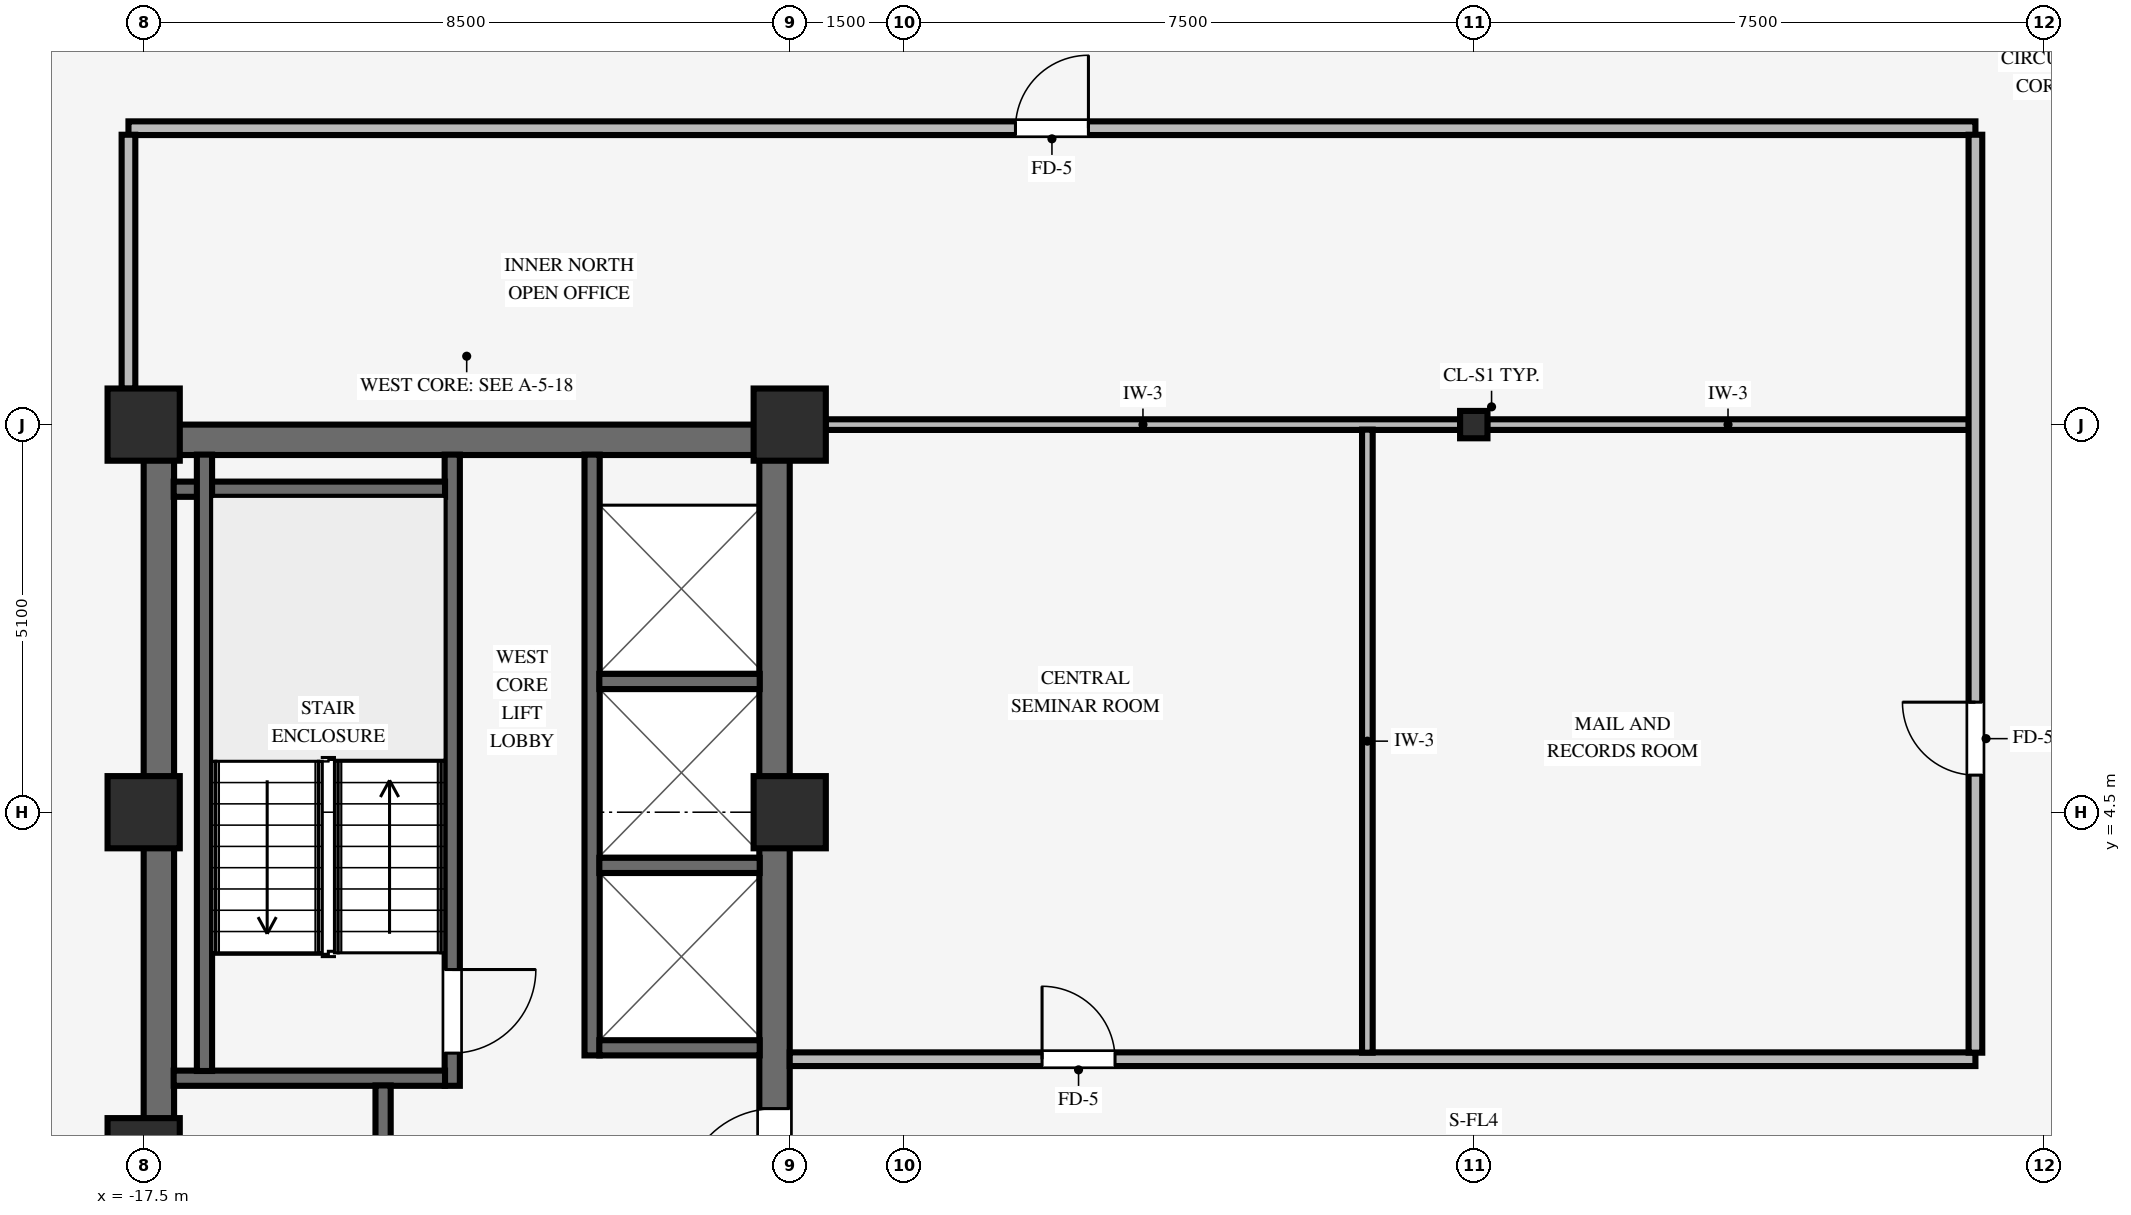
"""IFC4 building model, lengths in metres.
Left out: names, types, materials, properties, quantities, classifications, styles, units other than length and angle.
Written with IfcOpenShell. Run it as: python <this file> out.ifc"""

import sys

from ifc_helpers import new_model, si_unit, direction, frame, frame_2d, origin, origin_2d, place, context, subcontext, project, spatial, rectangle, i_section, extrude, source, transform, mapped, element, fill, save


model = new_model("IFC4")
c1 = context("Model", 3, precision=1e-05, world=origin(), true_north=direction((0.0, 1.0)))
c2 = subcontext(c1, "Body", "Model", "MODEL_VIEW")
j1 = project(units=[si_unit("LENGTHUNIT", "METRE"), si_unit("PLANEANGLEUNIT", "RADIAN")], contexts=[c1])
p1 = place(None, origin())
s1 = spatial("IfcSite", under=j1, at=p1, CompositionType="ELEMENT")
p2 = place(p1, origin())
s2 = spatial("IfcBuilding", under=s1, at=p2, CompositionType="ELEMENT")
p3 = place(p2, frame((0.0, 0.0, 134.8)))
s3 = spatial("IfcBuildingStorey", under=s2, at=p3, CompositionType="ELEMENT", Elevation=134.8)
p4 = place(p3, frame((-17.5, 9.4, 0.0), z_axis=(0.0, 0.0, 1.0), x_axis=(1.0, 0.0, 0.0)))
e1 = element("IfcWall", 1, at=p4, inside=s3, PredefinedType="SHEAR", context=c2, shape_type="SweptSolid", body=[
    extrude(rectangle(XDim=8.5, YDim=0.4, at=frame_2d((4.25, 0.0))), origin(), (0.0, 0.0, 1.0), 3.37),
])
p5 = place(p3, frame((-17.3, -9.205, 0.0), z_axis=(0.0, 0.0, 1.0), x_axis=(0.0, 1.0, 0.0)))
e2 = element("IfcWall", 2, at=p5, inside=s3, PredefinedType="SHEAR", context=c2, shape_type="SweptSolid", body=[
    extrude(rectangle(XDim=18.41, YDim=0.4, at=frame_2d((9.205, 0.0))), origin(), (0.0, 0.0, 1.0), 3.37),
])
p6 = place(p3, frame((-9.2, -9.205, 0.0), z_axis=(0.0, 0.0, 1.0), x_axis=(0.0, 1.0, 0.0)))
e3 = element("IfcWall", 3, at=p6, inside=s3, PredefinedType="SHEAR", context=c2, shape_type="SweptSolid", body=[
    extrude(rectangle(XDim=18.41, YDim=0.4, at=frame_2d((9.205, 0.0))), origin(), (0.0, 0.0, 1.0), 3.37),
])
p7 = place(p6, frame((8.605, 0.0, 0.0)))
e4 = element("IfcOpeningElement", 4, at=p7, cuts=e3, PredefinedType="OPENING", context=c2, shape_type="SweptSolid", body=[
    extrude(rectangle(XDim=1.2, YDim=2.15, at=frame_2d((0.6, 1.075))), frame((0.0, 0.21, 0.0), z_axis=(0.0, -1.0, 0.0), x_axis=(1.0, 0.0, 0.0)), (0.0, 0.0, 1.0), 0.42),
])
for number, where, z_axis, x_axis in (
    (5, (-17.5, 4.5, 0.0), (0.0, 0.0, 1.0), (1.0, 0.0, 0.0)),
    (6, (-17.5, 9.6, 0.0), (0.0, 0.0, 1.0), (1.0, 0.0, 0.0)),
    (7, (-9.0, 4.5, 0.0), (0.0, 0.0, 1.0), (1.0, 0.0, 0.0)),
    (8, (-9.0, 9.6, 0.0), (0.0, 0.0, 1.0), (1.0, 0.0, 0.0)),
    (9, (-17.5, 0.0, 0.0), (0.0, 0.0, 1.0), (1.0, 0.0, 0.0)),
):
    element("IfcColumn", number, at=place(p3, frame(where, z_axis=z_axis, x_axis=x_axis)), inside=s3, PredefinedType="COLUMN", context=c2, shape_type="SweptSolid", body=[
        extrude(rectangle(XDim=0.95, YDim=0.95, at=origin_2d()), origin(), (0.0, 0.0, 1.0), 3.37),
    ])
p8 = place(p3, frame((0.0, 9.6, 0.0), z_axis=(0.0, 0.0, 1.0), x_axis=(1.0, 0.0, 0.0)))
e10 = element("IfcColumn", 10, at=p8, inside=s3, PredefinedType="COLUMN", context=c2, shape_type="SweptSolid", body=[
    extrude(i_section(OverallWidth=0.36, OverallDepth=0.36, WebThickness=0.021, FlangeThickness=0.021, FilletRadius=0.018, at=origin_2d()), origin(), (0.0, 0.0, 1.0), 3.37),
])
p9 = place(p3, frame((-13.44, 0.9, 0.0), z_axis=(0.0, 0.0, 1.0), x_axis=(0.0, 1.0, 0.0)))
e11 = element("IfcWall", 11, at=p9, inside=s3, PredefinedType="SHEAR", context=c2, shape_type="SweptSolid", body=[
    extrude(rectangle(XDim=8.305, YDim=0.2, at=frame_2d((4.153, 0.0))), origin(), (0.0, 0.0, 1.0), 3.37),
])
p10 = place(p9, frame((1.53, 0.0, 0.0), z_axis=(0.0, 0.0, 1.0), x_axis=(-1.0, 0.0, 0.0)))
e12 = element("IfcOpeningElement", 12, at=p10, cuts=e11, PredefinedType="OPENING", context=c2, shape_type="SweptSolid", body=[
    extrude(rectangle(XDim=1.1, YDim=2.15, at=frame_2d((0.55, 1.075))), frame((0.0, 0.11, 0.0), z_axis=(0.0, -1.0, 0.0), x_axis=(1.0, 0.0, 0.0)), (0.0, 0.0, 1.0), 0.22),
])
for number, where, z_axis, x_axis in (
    (13, (-17.105, 1.0, 0.0), (0.0, 0.0, 1.0), (1.0, 0.0, 0.0)),
    (14, (-17.105, 8.75, 0.0), (0.0, 0.0, 1.0), (1.0, 0.0, 0.0)),
):
    element("IfcWall", number, at=place(p3, frame(where, z_axis=z_axis, x_axis=x_axis)), inside=s3, PredefinedType="SHEAR", context=c2, shape_type="SweptSolid", body=[
        extrude(rectangle(XDim=3.57, YDim=0.2, at=frame_2d((1.785, 0.0))), origin(), (0.0, 0.0, 1.0), 3.37),
    ])
p11 = place(p3, frame((-16.7, 1.095, 0.0), z_axis=(0.0, 0.0, 1.0), x_axis=(0.0, 1.0, 0.0)))
e15 = element("IfcWall", 15, at=p11, inside=s3, PredefinedType="SHEAR", context=c2, shape_type="SweptSolid", body=[
    extrude(rectangle(XDim=8.11, YDim=0.2, at=frame_2d((4.055, 0.0))), origin(), (0.0, 0.0, 1.0), 3.37),
])
p12 = place(p3, frame((-14.35, -6.2, 0.0), z_axis=(0.0, 0.0, 1.0), x_axis=(0.0, 1.0, 0.0)))
e16 = element("IfcWall", 16, at=p12, inside=s3, PredefinedType="SHEAR", context=c2, shape_type="SweptSolid", body=[
    extrude(rectangle(XDim=7.105, YDim=0.2, at=frame_2d((3.552, 0.0))), origin(), (0.0, 0.0, 1.0), 3.37),
])
p13 = place(p12, frame((5.69, 0.0, 0.0), z_axis=(0.0, 0.0, 1.0), x_axis=(-1.0, 0.0, 0.0)))
e17 = element("IfcOpeningElement", 17, at=p13, cuts=e16, PredefinedType="OPENING", context=c2, shape_type="SweptSolid", body=[
    extrude(rectangle(XDim=0.88, YDim=2.1, at=frame_2d((0.44, 1.05))), frame((0.0, 0.11, 0.0), z_axis=(0.0, -1.0, 0.0), x_axis=(1.0, 0.0, 0.0)), (0.0, 0.0, 1.0), 0.22),
])
p14 = place(p12, frame((1.15, 0.0, 0.0)))
e18 = element("IfcOpeningElement", 18, at=p14, cuts=e16, PredefinedType="OPENING", context=c2, shape_type="SweptSolid", body=[
    extrude(rectangle(XDim=1.3, YDim=2.2, at=frame_2d((0.65, 1.1))), frame((0.0, 0.11, 0.0), z_axis=(0.0, -1.0, 0.0), x_axis=(1.0, 0.0, 0.0)), (0.0, 0.0, 1.0), 0.22),
])
p15 = place(p3, frame((-11.6, 1.3, 0.0), z_axis=(0.0, 0.0, 1.0), x_axis=(0.0, 1.0, 0.0)))
e19 = element("IfcWall", 19, at=p15, inside=s3, PredefinedType="SHEAR", context=c2, shape_type="SweptSolid", body=[
    extrude(rectangle(XDim=7.905, YDim=0.2, at=frame_2d((3.953, 0.0))), origin(), (0.0, 0.0, 1.0), 3.37),
])
for number, where, z_axis, x_axis in (
    (20, (-11.505, 1.4, 0.0), (0.0, 0.0, 1.0), (1.0, 0.0, 0.0)),
    (21, (-11.505, 3.8, 0.0), (0.0, 0.0, 1.0), (1.0, 0.0, 0.0)),
    (22, (-11.505, 6.22, 0.0), (0.0, 0.0, 1.0), (1.0, 0.0, 0.0)),
):
    element("IfcWall", number, at=place(p3, frame(where, z_axis=z_axis, x_axis=x_axis)), inside=s3, PredefinedType="SHEAR", context=c2, shape_type="SweptSolid", body=[
        extrude(rectangle(XDim=2.11, YDim=0.2, at=frame_2d((1.055, 0.0))), origin(), (0.0, 0.0, 1.0), 3.37),
    ])
p16 = place(p3, frame((-9.0, 1.25, 0.0), z_axis=(0.0, 0.0, 1.0), x_axis=(1.0, 0.0, 0.0)))
e23 = element("IfcWall", 23, at=p16, inside=s3, PredefinedType="PARTITIONING", context=c2, shape_type="SweptSolid", body=[
    extrude(rectangle(XDim=15.6, YDim=0.18, at=frame_2d((7.8, 0.0))), origin(), (0.0, 0.0, 1.0), 3.36),
])
p17 = place(p16, frame((3.32, 0.0, 0.0)))
e24 = element("IfcOpeningElement", 24, at=p17, cuts=e23, PredefinedType="OPENING", context=c2, shape_type="SweptSolid", body=[
    extrude(rectangle(XDim=0.96, YDim=2.1, at=frame_2d((0.48, 1.05))), frame((0.0, 0.1, 0.0), z_axis=(0.0, -1.0, 0.0), x_axis=(1.0, 0.0, 0.0)), (0.0, 0.0, 1.0), 0.2),
])
p18 = place(p3, frame((-8.529, 9.6, 0.0), z_axis=(0.0, 0.0, 1.0), x_axis=(1.0, 0.0, 0.0)))
e25 = element("IfcWall", 25, at=p18, inside=s3, PredefinedType="PARTITIONING", context=c2, shape_type="SweptSolid", body=[
    extrude(rectangle(XDim=8.353, YDim=0.14, at=frame_2d((4.177, 0.0))), origin(), (0.0, 0.0, 1.0), 2.405),
])
p19 = place(p3, frame((0.176, 9.6, 0.0), z_axis=(0.0, 0.0, 1.0), x_axis=(1.0, 0.0, 0.0)))
e26 = element("IfcWall", 26, at=p19, inside=s3, PredefinedType="PARTITIONING", context=c2, shape_type="SweptSolid", body=[
    extrude(rectangle(XDim=6.338, YDim=0.14, at=frame_2d((3.169, 0.0))), origin(), (0.0, 0.0, 1.0), 2.405),
])
p20 = place(p3, frame((-17.7, 13.5, 0.0), z_axis=(0.0, 0.0, 1.0), x_axis=(1.0, 0.0, 0.0)))
e27 = element("IfcWall", 27, at=p20, inside=s3, PredefinedType="PARTITIONING", context=c2, shape_type="SweptSolid", body=[
    extrude(rectangle(XDim=24.3, YDim=0.18, at=frame_2d((12.15, 0.0))), origin(), (0.0, 0.0, 1.0), 2.998),
])
p21 = place(p20, frame((11.67, 0.0, 0.0)))
e28 = element("IfcOpeningElement", 28, at=p21, cuts=e27, PredefinedType="OPENING", context=c2, shape_type="SweptSolid", body=[
    extrude(rectangle(XDim=0.96, YDim=2.1, at=frame_2d((0.48, 1.05))), frame((0.0, 0.1, 0.0), z_axis=(0.0, -1.0, 0.0), x_axis=(1.0, 0.0, 0.0)), (0.0, 0.0, 1.0), 0.2),
])
p22 = place(p3, frame((-17.7, 10.071, 0.0), z_axis=(0.0, 0.0, 1.0), x_axis=(0.0, 1.0, 0.0)))
e29 = element("IfcWall", 29, at=p22, inside=s3, PredefinedType="PARTITIONING", context=c2, shape_type="SweptSolid", body=[
    extrude(rectangle(XDim=3.343, YDim=0.18, at=frame_2d((1.671, 0.0))), origin(), (0.0, 0.0, 1.0), 2.816),
])
p23 = place(p3, frame((-1.4, 1.336, 0.0), z_axis=(0.0, 0.0, 1.0), x_axis=(0.0, 1.0, 0.0)))
e30 = element("IfcWall", 30, at=p23, inside=s3, PredefinedType="PARTITIONING", context=c2, shape_type="SweptSolid", body=[
    extrude(rectangle(XDim=8.198, YDim=0.14, at=frame_2d((4.099, 0.0))), origin(), (0.0, 0.0, 1.0), 3.36),
])
p24 = place(p3, frame((6.6, 1.336, 0.0), z_axis=(0.0, 0.0, 1.0), x_axis=(0.0, 1.0, 0.0)))
e31 = element("IfcWall", 31, at=p24, inside=s3, PredefinedType="PARTITIONING", context=c2, shape_type="SweptSolid", body=[
    extrude(rectangle(XDim=12.078, YDim=0.18, at=frame_2d((6.039, 0.0))), origin(), (0.0, 0.0, 1.0), 3.36),
])
p25 = place(p24, frame((3.652, 0.0, 0.0)))
e32 = element("IfcOpeningElement", 32, at=p25, cuts=e31, PredefinedType="OPENING", context=c2, shape_type="SweptSolid", body=[
    extrude(rectangle(XDim=0.96, YDim=2.1, at=frame_2d((0.48, 1.05))), frame((0.0, 0.1, 0.0), z_axis=(0.0, -1.0, 0.0), x_axis=(1.0, 0.0, 0.0)), (0.0, 0.0, 1.0), 0.2),
])
m1 = source(origin(), c2, "Body", "SweptSolid", [
    extrude(rectangle(XDim=1.1, YDim=2.15, at=frame_2d((0.55, 1.075))), frame((0.0, 0.025, 0.0), z_axis=(0.0, -1.0, 0.0), x_axis=(1.0, 0.0, 0.0)), (0.0, 0.0, 1.0), 0.05),
])
p26 = place(p10, origin())
e33 = element("IfcDoor", 33, at=p26, inside=s3, OperationType="SINGLE_SWING_LEFT", PredefinedType="DOOR", context=c2, shape_type="MappedRepresentation", body=[
    mapped(m1, transform((0.0, 0.0, 0.0), scale=1.0)),
])
fill(e12, e33)
m2 = source(origin(), c2, "Body", "SweptSolid", [
    extrude(rectangle(XDim=1.2, YDim=2.15, at=frame_2d((0.6, 1.075))), frame((0.0, 0.025, 0.0), z_axis=(0.0, -1.0, 0.0), x_axis=(1.0, 0.0, 0.0)), (0.0, 0.0, 1.0), 0.05),
])
p27 = place(p7, origin())
e34 = element("IfcDoor", 34, at=p27, inside=s3, OperationType="SINGLE_SWING_LEFT", PredefinedType="DOOR", context=c2, shape_type="MappedRepresentation", body=[
    mapped(m2, transform((0.0, 0.0, 0.0), scale=1.0)),
])
fill(e4, e34)
m3 = source(origin(), c2, "Body", "SweptSolid", [
    extrude(rectangle(XDim=0.96, YDim=2.1, at=frame_2d((0.48, 1.05))), frame((0.0, 0.025, 0.0), z_axis=(0.0, -1.0, 0.0), x_axis=(1.0, 0.0, 0.0)), (0.0, 0.0, 1.0), 0.05),
])
p28 = place(p21, origin())
e35 = element("IfcDoor", 35, at=p28, inside=s3, OperationType="SINGLE_SWING_RIGHT", PredefinedType="DOOR", context=c2, shape_type="MappedRepresentation", body=[
    mapped(m3, transform((0.0, 0.0, 0.0), scale=1.0)),
])
fill(e28, e35)
p29 = place(p25, origin())
e36 = element("IfcDoor", 36, at=p29, inside=s3, OperationType="SINGLE_SWING_RIGHT", PredefinedType="DOOR", context=c2, shape_type="MappedRepresentation", body=[
    mapped(m3, transform((0.0, 0.0, 0.0), scale=1.0)),
])
fill(e32, e36)
p30 = place(p17, origin())
e37 = element("IfcDoor", 37, at=p30, inside=s3, OperationType="SINGLE_SWING_LEFT", PredefinedType="DOOR", context=c2, shape_type="MappedRepresentation", body=[
    mapped(m3, transform((0.0, 0.0, 0.0), scale=1.0)),
])
fill(e24, e37)
save(model, sys.argv[1])
